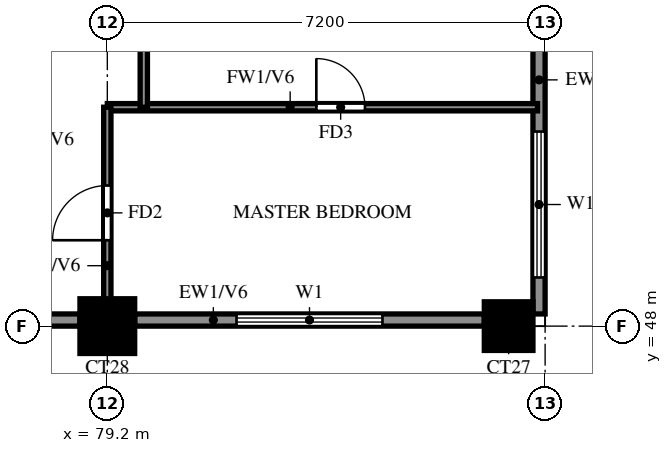
"""IFC4 building model, lengths in metres.
Left out: names, types, materials, properties, quantities, classifications, styles, units other than length and angle.
Written with IfcOpenShell. Run it as: python <this file> out.ifc"""

import sys

from ifc_helpers import new_model, si_unit, direction, frame, frame_2d, origin, origin_2d, place, context, subcontext, project, spatial, rectangle, extrude, source, transform, mapped, element, fill, save


model = new_model("IFC4")
c1 = context("Model", 3, precision=1e-05, world=origin(), true_north=direction((0.0, 1.0)))
c2 = subcontext(c1, "Body", "Model", "MODEL_VIEW")
j1 = project(units=[si_unit("LENGTHUNIT", "METRE"), si_unit("PLANEANGLEUNIT", "RADIAN")], contexts=[c1])
p1 = place(None, origin())
s1 = spatial("IfcSite", under=j1, at=p1, CompositionType="ELEMENT")
p2 = place(p1, origin())
s2 = spatial("IfcBuilding", under=s1, at=p2, CompositionType="ELEMENT")
p3 = place(p2, frame((0.0, 0.0, 202.5)))
s3 = spatial("IfcBuildingStorey", under=s2, at=p3, CompositionType="ELEMENT", Elevation=202.5)
m1 = source(origin(), c2, "Body", "SweptSolid", [
    extrude(rectangle(XDim=0.9, YDim=0.9, at=origin_2d()), origin(), (0.0, 0.0, 1.0), 3.1),
])
p4 = place(p3, frame((79.2, 48.0, 0.0), z_axis=(0.0, 0.0, 1.0), x_axis=(1.0, 0.0, 0.0)))
e1 = element("IfcColumn", 1, at=p4, inside=s3, PredefinedType="COLUMN", context=c2, shape_type="MappedRepresentation", body=[
    mapped(m1, transform((0.0, 0.0, 0.0))),
])
m2 = source(origin(), c2, "Body", "SweptSolid", [
    extrude(rectangle(XDim=0.8, YDim=0.8, at=origin_2d()), origin(), (0.0, 0.0, 1.0), 3.1),
])
p5 = place(p3, frame((85.8, 48.0, 0.0), z_axis=(0.0, 0.0, 1.0), x_axis=(1.0, 0.0, 0.0)))
e2 = element("IfcColumn", 2, at=p5, inside=s3, PredefinedType="COLUMN", context=c2, shape_type="MappedRepresentation", body=[
    mapped(m2, transform((0.0, 0.0, 0.0))),
])
p6 = place(p3, frame((85.719, 39.881, 0.0), z_axis=(0.0, 0.0, 1.0), x_axis=(-0.86377618652, 0.503875678716, 0.0)))
e3 = element("IfcWall", 3, at=p6, inside=s3, PredefinedType="SOLIDWALL", context=c2, shape_type="SweptSolid", body=[
    extrude(rectangle(XDim=16.311, YDim=0.2, at=frame_2d((8.156, 0.0))), origin(), (0.0, 0.0, 1.0), 3.1),
])
p7 = place(p6, frame((13.326, 0.0, 1.5)))
e4 = element("IfcOpeningElement", 4, at=p7, cuts=e3, PredefinedType="OPENING", context=c2, shape_type="SweptSolid", body=[
    extrude(rectangle(XDim=0.9, YDim=0.9, at=frame_2d((0.45, 0.45))), frame((0.0, 0.11, 0.0), z_axis=(0.0, -1.0, 0.0), x_axis=(1.0, 0.0, 0.0)), (0.0, 0.0, 1.0), 0.22),
])
p8 = place(p3, frame((71.99, 48.1, 0.0), z_axis=(0.0, 0.0, 1.0), x_axis=(1.0, 0.0, 0.0)))
e5 = element("IfcWall", 5, at=p8, inside=s3, PredefinedType="SOLIDWALL", context=c2, shape_type="SweptSolid", body=[
    extrude(rectangle(XDim=6.76, YDim=0.2, at=frame_2d((3.38, 0.0))), origin(), (0.0, 0.0, 1.0), 3.1),
])
p9 = place(p8, frame((2.205, 0.0, 1.5)))
e6 = element("IfcOpeningElement", 6, at=p9, cuts=e5, PredefinedType="OPENING", context=c2, shape_type="SweptSolid", body=[
    extrude(rectangle(XDim=0.9, YDim=0.9, at=frame_2d((0.45, 0.45))), frame((0.0, 0.11, 0.0), z_axis=(0.0, -1.0, 0.0), x_axis=(1.0, 0.0, 0.0)), (0.0, 0.0, 1.0), 0.22),
])
p10 = place(p3, frame((79.65, 48.1, 0.0), z_axis=(0.0, 0.0, 1.0), x_axis=(1.0, 0.0, 0.0)))
e7 = element("IfcWall", 7, at=p10, inside=s3, PredefinedType="SOLIDWALL", context=c2, shape_type="SweptSolid", body=[
    extrude(rectangle(XDim=5.75, YDim=0.2, at=frame_2d((2.875, 0.0))), origin(), (0.0, 0.0, 1.0), 3.1),
])
p11 = place(p10, frame((1.675, 0.0, 0.6)))
e8 = element("IfcOpeningElement", 8, at=p11, cuts=e7, PredefinedType="OPENING", context=c2, shape_type="SweptSolid", body=[
    extrude(rectangle(XDim=2.4, YDim=2.4, at=frame_2d((1.2, 1.2))), frame((0.0, 0.11, 0.0), z_axis=(0.0, -1.0, 0.0), x_axis=(1.0, 0.0, 0.0)), (0.0, 0.0, 1.0), 0.22),
])
p12 = place(p3, frame((86.3, 48.2, 0.0), z_axis=(0.0, 0.0, 1.0), x_axis=(0.0, 1.0, 0.0)))
e9 = element("IfcWall", 9, at=p12, inside=s3, PredefinedType="SOLIDWALL", context=c2, shape_type="SweptSolid", body=[
    extrude(rectangle(XDim=7.0, YDim=0.2, at=frame_2d((3.5, 0.0))), origin(), (0.0, 0.0, 1.0), 3.1),
])
p13 = place(p12, frame((0.6, 0.0, 0.6)))
e10 = element("IfcOpeningElement", 10, at=p13, cuts=e9, PredefinedType="OPENING", context=c2, shape_type="SweptSolid", body=[
    extrude(rectangle(XDim=2.4, YDim=2.4, at=frame_2d((1.2, 1.2))), frame((0.0, 0.11, 0.0), z_axis=(0.0, -1.0, 0.0), x_axis=(1.0, 0.0, 0.0)), (0.0, 0.0, 1.0), 0.22),
])
p14 = place(p12, frame((4.575, 0.0, 1.5)))
e11 = element("IfcOpeningElement", 11, at=p14, cuts=e9, PredefinedType="OPENING", context=c2, shape_type="SweptSolid", body=[
    extrude(rectangle(XDim=0.9, YDim=0.9, at=frame_2d((0.45, 0.45))), frame((0.0, 0.11, 0.0), z_axis=(0.0, -1.0, 0.0), x_axis=(1.0, 0.0, 0.0)), (0.0, 0.0, 1.0), 0.22),
])
p15 = place(p3, frame((79.2, 51.6, 0.0), z_axis=(0.0, 0.0, 1.0), x_axis=(1.0, 0.0, 0.0)))
e12 = element("IfcWall", 12, at=p15, inside=s3, PredefinedType="PARTITIONING", context=c2, shape_type="SweptSolid", body=[
    extrude(rectangle(XDim=7.075, YDim=0.12, at=frame_2d((3.538, 0.0))), origin(), (0.0, 0.0, 1.0), 3.1),
])
p16 = place(p15, frame((3.438, 0.0, 0.0)))
e13 = element("IfcOpeningElement", 13, at=p16, cuts=e12, PredefinedType="OPENING", context=c2, shape_type="SweptSolid", body=[
    extrude(rectangle(XDim=0.8, YDim=2.1, at=frame_2d((0.4, 1.05))), frame((0.0, 0.07, 0.0), z_axis=(0.0, -1.0, 0.0), x_axis=(1.0, 0.0, 0.0)), (0.0, 0.0, 1.0), 0.14),
])
p17 = place(p3, frame((79.2, 48.125, 0.0), z_axis=(0.0, 0.0, 1.0), x_axis=(0.0, 1.0, 0.0)))
e14 = element("IfcWall", 14, at=p17, inside=s3, PredefinedType="PARTITIONING", context=c2, shape_type="SweptSolid", body=[
    extrude(rectangle(XDim=3.475, YDim=0.12, at=frame_2d((1.738, 0.0))), origin(), (0.0, 0.0, 1.0), 3.1),
])
p18 = place(p17, frame((1.288, 0.0, 0.0)))
e15 = element("IfcOpeningElement", 15, at=p18, cuts=e14, PredefinedType="OPENING", context=c2, shape_type="SweptSolid", body=[
    extrude(rectangle(XDim=0.9, YDim=2.1, at=frame_2d((0.45, 1.05))), frame((0.0, 0.07, 0.0), z_axis=(0.0, -1.0, 0.0), x_axis=(1.0, 0.0, 0.0)), (0.0, 0.0, 1.0), 0.14),
])
p19 = place(p3, frame((79.8, 51.6, 0.0), z_axis=(0.0, 0.0, 1.0), x_axis=(0.0, 1.0, 0.0)))
e16 = element("IfcWall", 16, at=p19, inside=s3, PredefinedType="PARTITIONING", context=c2, shape_type="SweptSolid", body=[
    extrude(rectangle(XDim=3.6, YDim=0.12, at=frame_2d((1.8, 0.0))), origin(), (0.0, 0.0, 1.0), 3.1),
])
p20 = place(p11, origin())
e17 = element("IfcWindow", 17, at=p20, inside=s3, PartitioningType="DOUBLE_PANEL_VERTICAL", PredefinedType="WINDOW", context=c2, shape_type="SweptSolid", body=[
    extrude(rectangle(XDim=2.4, YDim=2.4, at=frame_2d((1.2, 1.2))), frame((0.0, 0.03, 0.0), z_axis=(0.0, -1.0, 0.0), x_axis=(1.0, 0.0, 0.0)), (0.0, 0.0, 1.0), 0.06),
])
fill(e8, e17)
p21 = place(p13, origin())
e18 = element("IfcWindow", 18, at=p21, inside=s3, PartitioningType="DOUBLE_PANEL_VERTICAL", PredefinedType="WINDOW", context=c2, shape_type="SweptSolid", body=[
    extrude(rectangle(XDim=2.4, YDim=2.4, at=frame_2d((1.2, 1.2))), frame((0.0, 0.03, 0.0), z_axis=(0.0, -1.0, 0.0), x_axis=(1.0, 0.0, 0.0)), (0.0, 0.0, 1.0), 0.06),
])
fill(e10, e18)
p22 = place(p18, origin())
e19 = element("IfcDoor", 19, at=p22, inside=s3, OperationType="SINGLE_SWING_LEFT", PredefinedType="DOOR", context=c2, shape_type="SweptSolid", body=[
    extrude(rectangle(XDim=0.9, YDim=2.1, at=frame_2d((0.45, 1.05))), frame((0.0, 0.025, 0.0), z_axis=(0.0, -1.0, 0.0), x_axis=(1.0, 0.0, 0.0)), (0.0, 0.0, 1.0), 0.05),
])
fill(e15, e19)
p23 = place(p16, origin())
e20 = element("IfcDoor", 20, at=p23, inside=s3, OperationType="SINGLE_SWING_LEFT", PredefinedType="DOOR", context=c2, shape_type="SweptSolid", body=[
    extrude(rectangle(XDim=0.8, YDim=2.1, at=frame_2d((0.4, 1.05))), frame((0.0, 0.025, 0.0), z_axis=(0.0, -1.0, 0.0), x_axis=(1.0, 0.0, 0.0)), (0.0, 0.0, 1.0), 0.05),
])
fill(e13, e20)
save(model, sys.argv[1])
